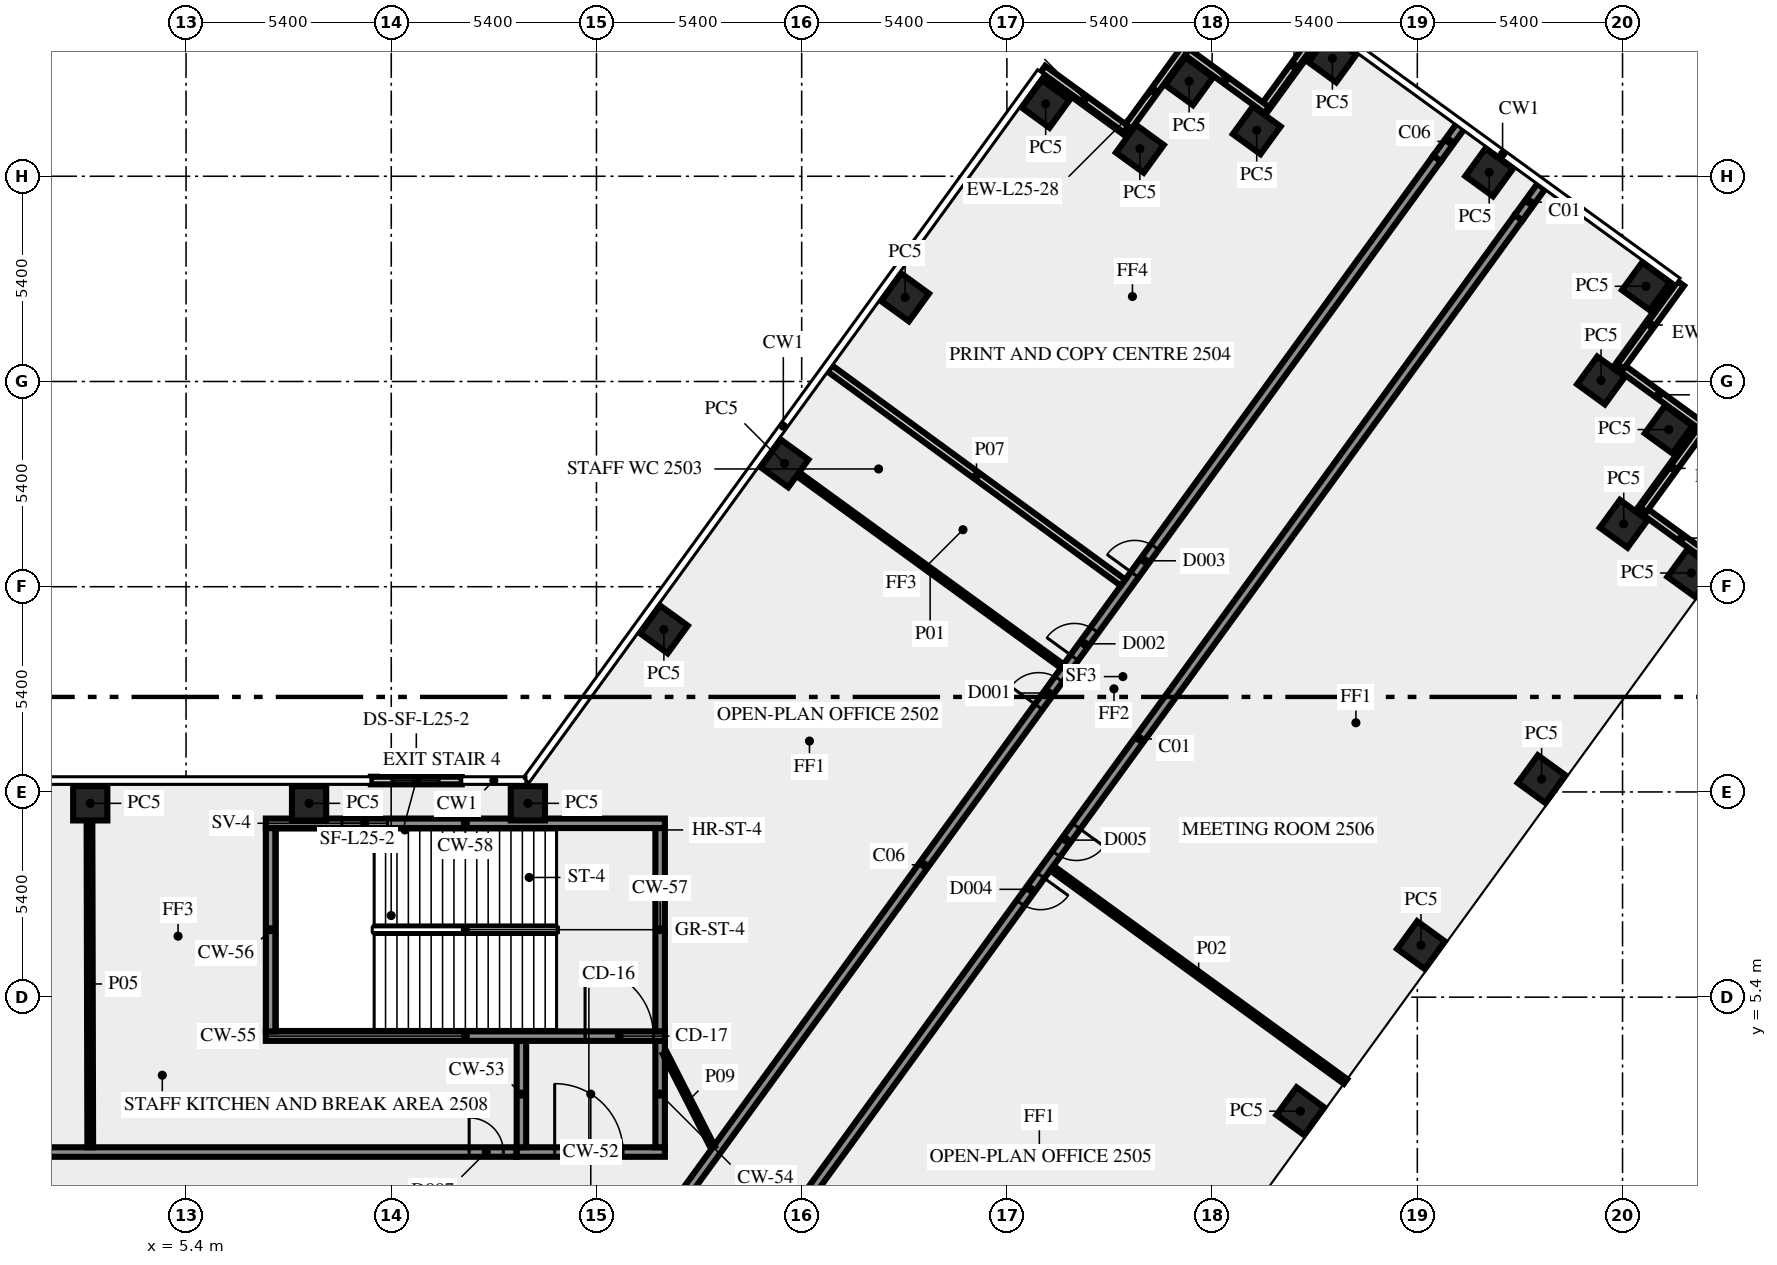
"""IFC4 building model, lengths in metres.
Left out: names, types, materials, properties, quantities, classifications, styles, units other than length and angle.
Written with IfcOpenShell. Run it as: python <this file> out.ifc"""

import sys

from ifc_helpers import new_model, si_unit, direction, frame, frame_2d, origin, origin_2d, place, context, subcontext, project, spatial, rectangle, extrude, element, fill, save


model = new_model("IFC4")
c1 = context("Model", 3, precision=1e-05, world=origin(), true_north=direction((0.0, 1.0)))
c2 = subcontext(c1, "Body", "Model", "MODEL_VIEW")
j1 = project(units=[si_unit("LENGTHUNIT", "METRE"), si_unit("PLANEANGLEUNIT", "RADIAN")], contexts=[c1])
p1 = place(None, origin())
s1 = spatial("IfcSite", under=j1, at=p1, CompositionType="ELEMENT")
p2 = place(p1, origin())
s2 = spatial("IfcBuilding", under=s1, at=p2, CompositionType="ELEMENT")
p3 = place(p2, frame((0.0, 0.0, 109.0)))
s3 = spatial("IfcBuildingStorey", under=s2, at=p3, CompositionType="ELEMENT", Elevation=109.0)
for number, where, z_axis, x_axis in (
    (1, (34.722, 2.4, 0.0), (0.0, 0.0, 1.0), (0.588, 0.809, 0.0)),
    (2, (37.896, 6.769, 0.0), (0.0, 0.0, 1.0), (0.588, 0.809, 0.0)),
    (3, (41.07, 11.137, 0.0), (0.0, 0.0, 1.0), (0.588, 0.809, 0.0)),
    (4, (45.01, 16.56, 0.0), (0.0, 0.0, 1.0), (0.588, 0.809, 0.0)),
    (5, (43.231, 17.854, 0.0), (0.0, 0.0, 1.0), (0.588, 0.809, 0.0)),
    (6, (44.415, 20.335, 0.0), (0.0, 0.0, 1.0), (0.588, 0.809, 0.0)),
    (7, (42.635, 21.626, 0.0), (0.0, 0.0, 1.0), (-0.809, 0.588, 0.0)),
    (8, (43.815, 24.105, 0.0), (0.0, 0.0, 1.0), (-0.809, 0.588, 0.0)),
    (9, (39.691, 27.102, 0.0), (0.0, 0.0, 1.0), (-0.809, 0.588, 0.0)),
    (10, (35.565, 30.1, 0.0), (0.0, 0.0, 1.0), (-0.588, -0.809, 0.0)),
    (11, (33.574, 28.209, 0.0), (0.0, 0.0, 1.0), (-0.809, 0.588, 0.0)),
    (12, (31.795, 29.5, 0.0), (0.0, 0.0, 1.0), (-0.588, -0.809, 0.0)),
    (13, (30.499, 27.723, 0.0), (0.0, 0.0, 1.0), (-0.809, 0.588, 0.0)),
    (14, (28.02, 28.905, 0.0), (0.0, 0.0, 1.0), (-0.809, 0.588, 0.0)),
    (15, (24.321, 23.812, 0.0), (0.0, 0.0, 1.0), (-0.588, -0.809, 0.0)),
    (16, (21.147, 19.444, 0.0), (0.0, 0.0, 1.0), (-0.588, -0.809, 0.0)),
    (17, (17.974, 15.075, 0.0), (0.0, 0.0, 1.0), (-0.588, -0.809, 0.0)),
    (18, (14.395, 10.5, 0.0), (0.0, 0.0, 1.0), (-1.0, 0.0, 0.0)),
    (19, (8.637, 10.5, 0.0), (0.0, 0.0, 1.0), (-1.0, 0.0, 0.0)),
    (20, (2.879, 10.5, 0.0), (0.0, 0.0, 1.0), (-1.0, 0.0, 0.0)),
):
    element("IfcColumn", number, at=place(p3, frame(where, z_axis=z_axis, x_axis=x_axis)), inside=s3, PredefinedType="COLUMN", context=c2, shape_type="SweptSolid", body=[
        extrude(rectangle(XDim=0.9, YDim=0.9, at=origin_2d()), origin(), (0.0, 0.0, 1.0), 3.65),
    ])
for number, where, z_axis, x_axis in (
    (21, (45.842, 16.685, 0.0), (0.0, 0.0, 1.0), (-0.809, 0.588, 0.0)),
    (22, (43.746, 18.223, 0.0), (0.0, 0.0, 1.0), (0.588, 0.809, 0.0)),
    (23, (45.245, 20.456, 0.0), (0.0, 0.0, 1.0), (-0.809, 0.588, 0.0)),
    (24, (43.149, 21.994, 0.0), (0.0, 0.0, 1.0), (0.588, 0.809, 0.0)),
    (25, (35.351, 30.997, 0.0), (0.0, 0.0, 1.0), (-0.588, -0.809, 0.0)),
    (26, (33.838, 28.744, 0.0), (0.0, 0.0, 1.0), (-0.809, 0.588, 0.0)),
    (27, (31.67, 30.333, 0.0), (0.0, 0.0, 1.0), (-0.588, -0.809, 0.0)),
    (28, (30.133, 28.237, 0.0), (0.0, 0.0, 1.0), (-0.809, 0.588, 0.0)),
):
    element("IfcWall", number, at=place(p3, frame(where, z_axis=z_axis, x_axis=x_axis)), inside=s3, PredefinedType="SOLIDWALL", context=c2, shape_type="SweptSolid", body=[
        extrude(rectangle(XDim=2.7, YDim=0.2, at=frame_2d((1.35, 0.0))), origin(), (0.0, 0.0, 1.0), 3.65),
    ])
p4 = place(p3, frame((12.655, 11.1, 0.0), z_axis=(0.0, 0.0, 1.0), x_axis=(-1.0, 0.0, 0.0)))
e29 = element("IfcWall", 29, at=p4, inside=s3, PredefinedType="SOLIDWALL", context=c2, shape_type="SweptSolid", body=[
    extrude(rectangle(XDim=2.392, YDim=0.2, at=frame_2d((1.196, 0.0))), origin(), (0.0, 0.0, 1.0), 3.65),
])
p5 = place(p4, frame((0.596, 0.0, 1.0)))
e30 = element("IfcOpeningElement", 30, at=p5, cuts=e29, PredefinedType="OPENING", context=c2, shape_type="SweptSolid", body=[
    extrude(rectangle(XDim=1.2, YDim=1.2, at=frame_2d((0.6, 0.6))), frame((0.0, 0.11, 0.0), z_axis=(0.0, -1.0, 0.0), x_axis=(1.0, 0.0, 0.0)), (0.0, 0.0, 1.0), 0.22),
])
p6 = place(p3, frame((14.1, 1.325, 0.0), z_axis=(0.0, 0.0, 1.0), x_axis=(1.0, 0.0, 0.0)))
e31 = element("IfcWall", 31, at=p6, inside=s3, PredefinedType="SHEAR", context=c2, shape_type="SweptSolid", body=[
    extrude(rectangle(XDim=3.9, YDim=0.25, at=frame_2d((1.95, 0.0))), origin(), (0.0, 0.0, 1.0), 3.65),
])
p7 = place(p6, frame((1.0, 0.0, 0.0)))
e32 = element("IfcOpeningElement", 32, at=p7, cuts=e31, PredefinedType="OPENING", context=c2, shape_type="SweptSolid", body=[
    extrude(rectangle(XDim=1.8, YDim=2.1, at=frame_2d((0.9, 1.05))), frame((0.0, 0.135, 0.0), z_axis=(0.0, -1.0, 0.0), x_axis=(1.0, 0.0, 0.0)), (0.0, 0.0, 1.0), 0.27),
])
for number, where, z_axis, x_axis in (
    (33, (14.225, 1.45, 0.0), (0.0, 0.0, 1.0), (0.0, 1.0, 0.0)),
    (34, (17.875, 1.45, 0.0), (0.0, 0.0, 1.0), (0.0, 1.0, 0.0)),
):
    element("IfcWall", number, at=place(p3, frame(where, z_axis=z_axis, x_axis=x_axis)), inside=s3, PredefinedType="SHEAR", context=c2, shape_type="SweptSolid", body=[
        extrude(rectangle(XDim=2.8, YDim=0.25, at=frame_2d((1.4, 0.0))), origin(), (0.0, 0.0, 1.0), 3.65),
    ])
p8 = place(p3, frame((7.5, 4.375, 0.0), z_axis=(0.0, 0.0, 1.0), x_axis=(1.0, 0.0, 0.0)))
e35 = element("IfcWall", 35, at=p8, inside=s3, PredefinedType="SHEAR", context=c2, shape_type="SweptSolid", body=[
    extrude(rectangle(XDim=10.5, YDim=0.25, at=frame_2d((5.25, 0.0))), origin(), (0.0, 0.0, 1.0), 3.65),
])
p9 = place(p8, frame((8.4, 0.0, 0.0)))
e36 = element("IfcOpeningElement", 36, at=p9, cuts=e35, PredefinedType="OPENING", context=c2, shape_type="SweptSolid", body=[
    extrude(rectangle(XDim=1.8, YDim=2.1, at=frame_2d((0.9, 1.05))), frame((0.0, 0.135, 0.0), z_axis=(0.0, -1.0, 0.0), x_axis=(1.0, 0.0, 0.0)), (0.0, 0.0, 1.0), 0.27),
])
for number, where, z_axis, x_axis in (
    (37, (7.625, 4.5, 0.0), (0.0, 0.0, 1.0), (0.0, 1.0, 0.0)),
    (38, (17.875, 4.5, 0.0), (0.0, 0.0, 1.0), (0.0, 1.0, 0.0)),
):
    element("IfcWall", number, at=place(p3, frame(where, z_axis=z_axis, x_axis=x_axis)), inside=s3, PredefinedType="SHEAR", context=c2, shape_type="SweptSolid", body=[
        extrude(rectangle(XDim=5.35, YDim=0.25, at=frame_2d((2.675, 0.0))), origin(), (0.0, 0.0, 1.0), 3.65),
    ])
p10 = place(p3, frame((7.5, 9.975, 0.0), z_axis=(0.0, 0.0, 1.0), x_axis=(1.0, 0.0, 0.0)))
e39 = element("IfcWall", 39, at=p10, inside=s3, PredefinedType="SHEAR", context=c2, shape_type="SweptSolid", body=[
    extrude(rectangle(XDim=10.5, YDim=0.25, at=frame_2d((5.25, 0.0))), origin(), (0.0, 0.0, 1.0), 3.65),
])
p11 = place(p10, frame((2.0, 0.0, 1.0)))
e40 = element("IfcOpeningElement", 40, at=p11, cuts=e39, PredefinedType="OPENING", context=c2, shape_type="SweptSolid", body=[
    extrude(rectangle(XDim=1.2, YDim=1.2, at=frame_2d((0.6, 0.6))), frame((0.0, 0.135, 0.0), z_axis=(0.0, -1.0, 0.0), x_axis=(1.0, 0.0, 0.0)), (0.0, 0.0, 1.0), 0.27),
])
p12 = place(p3, frame((40.463, 25.911, 0.0), z_axis=(0.0, 0.0, 1.0), x_axis=(-0.587781654618, -0.809019608226, 0.0)))
e41 = element("IfcWall", 41, at=p12, inside=s3, PredefinedType="SOLIDWALL", context=c2, shape_type="SweptSolid", body=[
    extrude(rectangle(XDim=33.911, YDim=0.25, at=frame_2d((16.956, 0.0))), origin(), (0.0, 0.0, 1.0), 3.65),
])
p13 = place(p12, frame((21.396, 0.0, 0.0)))
e42 = element("IfcOpeningElement", 42, at=p13, cuts=e41, PredefinedType="OPENING", context=c2, shape_type="SweptSolid", body=[
    extrude(rectangle(XDim=0.9, YDim=2.1, at=frame_2d((0.45, 1.05))), frame((0.0, 0.135, 0.0), z_axis=(0.0, -1.0, 0.0), x_axis=(1.0, 0.0, 0.0)), (0.0, 0.0, 1.0), 0.27),
])
p14 = place(p12, frame((19.795, 0.0, 0.0)))
e43 = element("IfcOpeningElement", 43, at=p14, cuts=e41, PredefinedType="OPENING", context=c2, shape_type="SweptSolid", body=[
    extrude(rectangle(XDim=0.9, YDim=2.1, at=frame_2d((0.45, 1.05))), frame((0.0, 0.135, 0.0), z_axis=(0.0, -1.0, 0.0), x_axis=(1.0, 0.0, 0.0)), (0.0, 0.0, 1.0), 0.27),
])
p15 = place(p3, frame((-14.09, 1.325, 0.0), z_axis=(0.0, 0.0, 1.0), x_axis=(1.0, 0.0, 0.0)))
e44 = element("IfcWall", 44, at=p15, inside=s3, PredefinedType="SOLIDWALL", context=c2, shape_type="SweptSolid", body=[
    extrude(rectangle(XDim=28.18, YDim=0.25, at=frame_2d((14.09, 0.0))), origin(), (0.0, 0.0, 1.0), 3.65),
])
p16 = place(p15, frame((0.34, 0.0, 0.0)))
e45 = element("IfcOpeningElement", 45, at=p16, cuts=e44, PredefinedType="OPENING", context=c2, shape_type="SweptSolid", body=[
    extrude(rectangle(XDim=0.9, YDim=2.1, at=frame_2d((0.45, 1.05))), frame((0.0, 0.135, 0.0), z_axis=(0.0, -1.0, 0.0), x_axis=(1.0, 0.0, 0.0)), (0.0, 0.0, 1.0), 0.27),
])
p17 = place(p15, frame((26.94, 0.0, 0.0)))
e46 = element("IfcOpeningElement", 46, at=p17, cuts=e44, PredefinedType="OPENING", context=c2, shape_type="SweptSolid", body=[
    extrude(rectangle(XDim=0.9, YDim=2.1, at=frame_2d((0.45, 1.05))), frame((0.0, 0.135, 0.0), z_axis=(0.0, -1.0, 0.0), x_axis=(1.0, 0.0, 0.0)), (0.0, 0.0, 1.0), 0.27),
])
p18 = place(p3, frame((17.545, -1.125, 0.0), z_axis=(0.0, 0.0, 1.0), x_axis=(0.587788021768, 0.809014982226, 0.0)))
e47 = element("IfcWall", 47, at=p18, inside=s3, PredefinedType="SOLIDWALL", context=c2, shape_type="SweptSolid", body=[
    extrude(rectangle(XDim=35.344, YDim=0.25, at=frame_2d((17.672, 0.0))), origin(), (0.0, 0.0, 1.0), 3.65),
])
p19 = place(p18, frame((17.508, 0.0, 0.0)))
e48 = element("IfcOpeningElement", 48, at=p19, cuts=e47, PredefinedType="OPENING", context=c2, shape_type="SweptSolid", body=[
    extrude(rectangle(XDim=0.9, YDim=2.1, at=frame_2d((0.45, 1.05))), frame((0.0, 0.135, 0.0), z_axis=(0.0, -1.0, 0.0), x_axis=(1.0, 0.0, 0.0)), (0.0, 0.0, 1.0), 0.27),
])
p20 = place(p18, frame((21.808, 0.0, 0.0)))
e49 = element("IfcOpeningElement", 49, at=p20, cuts=e47, PredefinedType="OPENING", context=c2, shape_type="SweptSolid", body=[
    extrude(rectangle(XDim=0.9, YDim=2.1, at=frame_2d((0.45, 1.05))), frame((0.0, 0.135, 0.0), z_axis=(0.0, -1.0, 0.0), x_axis=(1.0, 0.0, 0.0)), (0.0, 0.0, 1.0), 0.27),
])
p21 = place(p18, frame((19.108, 0.0, 0.0)))
e50 = element("IfcOpeningElement", 50, at=p21, cuts=e47, PredefinedType="OPENING", context=c2, shape_type="SweptSolid", body=[
    extrude(rectangle(XDim=0.9, YDim=2.1, at=frame_2d((0.45, 1.05))), frame((0.0, 0.135, 0.0), z_axis=(0.0, -1.0, 0.0), x_axis=(1.0, 0.0, 0.0)), (0.0, 0.0, 1.0), 0.27),
])
p22 = place(p3, frame((28.457, 14.108, 0.0), z_axis=(0.0, 0.0, 1.0), x_axis=(-0.808998863664, 0.587810206266, 0.0)))
e51 = element("IfcWall", 51, at=p22, inside=s3, PredefinedType="PARTITIONING", context=c2, shape_type="SweptSolid", body=[
    extrude(rectangle(XDim=8.595, YDim=0.12, at=frame_2d((4.297, 0.0))), origin(), (0.0, 0.0, 1.0), 3.65),
])
p23 = place(p3, frame((35.909, 3.183, 0.0), z_axis=(0.0, 0.0, 1.0), x_axis=(-0.809045492695, 0.587746025721, 0.0)))
e52 = element("IfcWall", 52, at=p23, inside=s3, PredefinedType="PARTITIONING", context=c2, shape_type="SweptSolid", body=[
    extrude(rectangle(XDim=9.551, YDim=0.15, at=frame_2d((4.775, 0.0))), origin(), (0.0, 0.0, 1.0), 2.75),
])
p24 = place(p3, frame((2.879, 1.45, 0.0), z_axis=(0.0, 0.0, 1.0), x_axis=(-0.002357613104, 0.999997220826, 0.0)))
e53 = element("IfcWall", 53, at=p24, inside=s3, PredefinedType="PARTITIONING", context=c2, shape_type="SweptSolid", body=[
    extrude(rectangle(XDim=8.595, YDim=0.15, at=frame_2d((4.297, 0.0))), origin(), (0.0, 0.0, 1.0), 3.65),
])
p25 = place(p3, frame((22.344, 21.94, 0.0), z_axis=(0.0, 0.0, 1.0), x_axis=(0.807610282865, -0.589716568371, 0.0)))
e54 = element("IfcWall", 54, at=p25, inside=s3, PredefinedType="SOLIDWALL", context=c2, shape_type="SweptSolid", body=[
    extrude(rectangle(XDim=9.55, YDim=0.2, at=frame_2d((4.775, 0.0))), origin(), (0.0, 0.0, 1.0), 2.75),
])
p26 = place(p3, frame((18.0, 3.925, 0.0), z_axis=(0.0, 0.0, 1.0), x_axis=(0.453950796792, -0.891026752736, 0.0)))
e55 = element("IfcWall", 55, at=p26, inside=s3, PredefinedType="PARTITIONING", context=c2, shape_type="SweptSolid", body=[
    extrude(rectangle(XDim=2.778, YDim=0.12, at=frame_2d((1.389, 0.0))), origin(), (0.0, 0.0, 1.0), 3.65),
])
p27 = place(p3, frame((40.463, 25.911, 0.0), z_axis=(0.0, 0.0, 1.0), x_axis=(0.587855200732, 0.808966169238, 0.0)))
e56 = element("IfcWall", 56, at=p27, inside=s3, PredefinedType="SOLIDWALL", context=c2, shape_type="SweptSolid", body=[
    extrude(rectangle(XDim=1.009, YDim=0.25, at=frame_2d((0.505, 0.0))), origin(), (0.0, 0.0, 1.0), 2.75),
])
p28 = place(p3, frame((38.32, 27.469, 0.0), z_axis=(0.0, 0.0, 1.0), x_axis=(0.587753086208, 0.809040363426, 0.0)))
e57 = element("IfcWall", 57, at=p28, inside=s3, PredefinedType="SOLIDWALL", context=c2, shape_type="SweptSolid", body=[
    extrude(rectangle(XDim=1.11, YDim=0.25, at=frame_2d((0.555, 0.0))), origin(), (0.0, 0.0, 1.0), 2.75),
])
p29 = place(p5, origin())
e58 = element("IfcWindow", 58, at=p29, inside=s3, PartitioningType="SINGLE_PANEL", PredefinedType="WINDOW", context=c2, shape_type="SweptSolid", body=[
    extrude(rectangle(XDim=1.2, YDim=1.2, at=frame_2d((0.6, 0.6))), frame((0.0, 0.03, 0.0), z_axis=(0.0, -1.0, 0.0), x_axis=(1.0, 0.0, 0.0)), (0.0, 0.0, 1.0), 0.06),
])
fill(e30, e58)
p30 = place(p7, origin())
e59 = element("IfcDoor", 59, at=p30, inside=s3, OperationType="DOUBLE_DOOR_SINGLE_SWING", PredefinedType="DOOR", context=c2, shape_type="SweptSolid", body=[
    extrude(rectangle(XDim=1.8, YDim=2.1, at=frame_2d((0.9, 1.05))), frame((0.0, 0.025, 0.0), z_axis=(0.0, -1.0, 0.0), x_axis=(1.0, 0.0, 0.0)), (0.0, 0.0, 1.0), 0.05),
])
fill(e32, e59)
p31 = place(p9, origin())
e60 = element("IfcDoor", 60, at=p31, inside=s3, OperationType="DOUBLE_DOOR_SINGLE_SWING", PredefinedType="DOOR", context=c2, shape_type="SweptSolid", body=[
    extrude(rectangle(XDim=1.8, YDim=2.1, at=frame_2d((0.9, 1.05))), frame((0.0, 0.025, 0.0), z_axis=(0.0, -1.0, 0.0), x_axis=(1.0, 0.0, 0.0)), (0.0, 0.0, 1.0), 0.05),
])
fill(e36, e60)
p32 = place(p11, origin())
e61 = element("IfcWindow", 61, at=p32, inside=s3, PartitioningType="SINGLE_PANEL", PredefinedType="WINDOW", context=c2, shape_type="SweptSolid", body=[
    extrude(rectangle(XDim=1.2, YDim=1.2, at=frame_2d((0.6, 0.6))), frame((0.0, 0.03, 0.0), z_axis=(0.0, -1.0, 0.0), x_axis=(1.0, 0.0, 0.0)), (0.0, 0.0, 1.0), 0.06),
])
fill(e40, e61)
p33 = place(p19, origin())
e62 = element("IfcDoor", 62, at=p33, inside=s3, OperationType="SINGLE_SWING_RIGHT", PredefinedType="DOOR", context=c2, shape_type="SweptSolid", body=[
    extrude(rectangle(XDim=0.9, YDim=2.1, at=frame_2d((0.45, 1.05))), frame((0.0, 0.025, 0.0), z_axis=(0.0, -1.0, 0.0), x_axis=(1.0, 0.0, 0.0)), (0.0, 0.0, 1.0), 0.05),
])
fill(e48, e62)
p34 = place(p13, origin())
e63 = element("IfcDoor", 63, at=p34, inside=s3, OperationType="SINGLE_SWING_LEFT", PredefinedType="DOOR", context=c2, shape_type="SweptSolid", body=[
    extrude(rectangle(XDim=0.9, YDim=2.1, at=frame_2d((0.45, 1.05))), frame((0.0, 0.025, 0.0), z_axis=(0.0, -1.0, 0.0), x_axis=(1.0, 0.0, 0.0)), (0.0, 0.0, 1.0), 0.05),
])
fill(e42, e63)
p35 = place(p14, origin())
e64 = element("IfcDoor", 64, at=p35, inside=s3, OperationType="SINGLE_SWING_RIGHT", PredefinedType="DOOR", context=c2, shape_type="SweptSolid", body=[
    extrude(rectangle(XDim=0.9, YDim=2.1, at=frame_2d((0.45, 1.05))), frame((0.0, 0.025, 0.0), z_axis=(0.0, -1.0, 0.0), x_axis=(1.0, 0.0, 0.0)), (0.0, 0.0, 1.0), 0.05),
])
fill(e43, e64)
p36 = place(p20, origin())
e65 = element("IfcDoor", 65, at=p36, inside=s3, OperationType="SINGLE_SWING_LEFT", PredefinedType="DOOR", context=c2, shape_type="SweptSolid", body=[
    extrude(rectangle(XDim=0.9, YDim=2.1, at=frame_2d((0.45, 1.05))), frame((0.0, 0.025, 0.0), z_axis=(0.0, -1.0, 0.0), x_axis=(1.0, 0.0, 0.0)), (0.0, 0.0, 1.0), 0.05),
])
fill(e49, e65)
p37 = place(p17, origin())
e66 = element("IfcDoor", 66, at=p37, inside=s3, OperationType="SINGLE_SWING_RIGHT", PredefinedType="DOOR", context=c2, shape_type="SweptSolid", body=[
    extrude(rectangle(XDim=0.9, YDim=2.1, at=frame_2d((0.45, 1.05))), frame((0.0, 0.025, 0.0), z_axis=(0.0, -1.0, 0.0), x_axis=(1.0, 0.0, 0.0)), (0.0, 0.0, 1.0), 0.05),
])
fill(e46, e66)
p38 = place(p21, origin())
e67 = element("IfcDoor", 67, at=p38, inside=s3, OperationType="SINGLE_SWING_LEFT", PredefinedType="DOOR", context=c2, shape_type="SweptSolid", body=[
    extrude(rectangle(XDim=0.9, YDim=2.1, at=frame_2d((0.45, 1.05))), frame((0.0, 0.025, 0.0), z_axis=(0.0, -1.0, 0.0), x_axis=(1.0, 0.0, 0.0)), (0.0, 0.0, 1.0), 0.05),
])
fill(e50, e67)
save(model, sys.argv[1])
